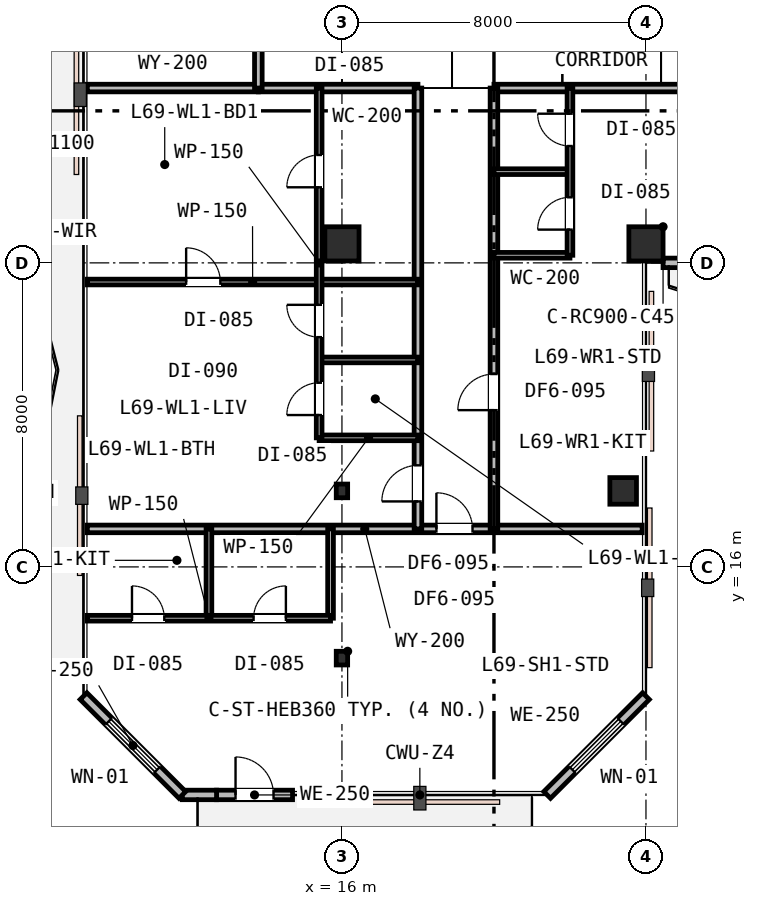
"""IFC4 building model, lengths in metres.
Left out: names, types, materials, properties, quantities, classifications, styles, units other than length and angle.
Written with IfcOpenShell. Run it as: python <this file> out.ifc"""

import sys

from ifc_helpers import new_model, si_unit, direction, frame, frame_2d, origin, origin_2d, place, context, subcontext, project, spatial, rectangle, i_section, extrude, element, fill, save


model = new_model("IFC4")
c1 = context("Model", 3, precision=1e-05, world=origin(), true_north=direction((0.0, 1.0)))
c2 = subcontext(c1, "Body", "Model", "MODEL_VIEW")
j1 = project(units=[si_unit("LENGTHUNIT", "METRE"), si_unit("PLANEANGLEUNIT", "RADIAN")], contexts=[c1])
p1 = place(None, origin())
s1 = spatial("IfcSite", under=j1, at=p1, CompositionType="ELEMENT")
p2 = place(p1, origin())
s2 = spatial("IfcBuilding", under=s1, at=p2, CompositionType="ELEMENT")
p3 = place(p2, frame((0.0, 0.0, 267.8)))
s3 = spatial("IfcBuildingStorey", under=s2, at=p3, CompositionType="ELEMENT", Elevation=267.8)
for number, where, z_axis, x_axis in (
    (1, (16.0, 24.5, 0.0), (0.0, 0.0, 1.0), (1.0, 0.0, 0.0)),
    (2, (24.0, 24.5, 0.0), (0.0, 0.0, 1.0), (1.0, 0.0, 0.0)),
):
    element("IfcColumn", number, at=place(p3, frame(where, z_axis=z_axis, x_axis=x_axis)), inside=s3, PredefinedType="COLUMN", context=c2, shape_type="SweptSolid", body=[
        extrude(rectangle(XDim=0.9, YDim=0.9, at=origin_2d()), origin(), (0.0, 0.0, 1.0), 3.8),
    ])
p4 = place(p3, frame((23.4, 18.0, 0.0), z_axis=(0.0, 0.0, 1.0), x_axis=(1.0, 0.0, 0.0)))
e3 = element("IfcColumn", 3, at=p4, inside=s3, PredefinedType="COLUMN", context=c2, shape_type="SweptSolid", body=[
    extrude(rectangle(XDim=0.7, YDim=0.7, at=origin_2d()), origin(), (0.0, 0.0, 1.0), 3.8),
])
for number, where, z_axis, x_axis in (
    (4, (16.0, 13.6, 0.0), (0.0, 0.0, 1.0), (1.0, 0.0, 0.0)),
    (5, (16.0, 18.0, 0.0), (0.0, 0.0, 1.0), (1.0, 0.0, 0.0)),
):
    element("IfcColumn", number, at=place(p3, frame(where, z_axis=z_axis, x_axis=x_axis)), inside=s3, PredefinedType="COLUMN", context=c2, shape_type="SweptSolid", body=[
        extrude(i_section(OverallWidth=0.3, OverallDepth=0.36, WebThickness=0.013, FlangeThickness=0.022, FilletRadius=0.027, at=origin_2d()), origin(), (0.0, 0.0, 1.0), 3.8),
    ])
p5 = place(p3, frame((12.7, 10.0, 0.0), z_axis=(0.0, 0.0, 1.0), x_axis=(1.0, 0.0, 0.0)))
e6 = element("IfcWall", 6, at=p5, inside=s3, PredefinedType="STANDARD", context=c2, shape_type="SweptSolid", body=[
    extrude(rectangle(XDim=2.0, YDim=0.25, at=frame_2d((1.0, 0.0))), origin(), (0.0, 0.0, 1.0), 3.53),
])
p6 = place(p5, frame((0.5, 0.0, 0.0)))
e7 = element("IfcOpeningElement", 7, at=p6, cuts=e6, PredefinedType="OPENING", context=c2, shape_type="SweptSolid", body=[
    extrude(rectangle(XDim=1.0, YDim=2.15, at=frame_2d((0.5, 1.075))), frame((0.0, 0.135, 0.0), z_axis=(0.0, -1.0, 0.0), x_axis=(1.0, 0.0, 0.0)), (0.0, 0.0, 1.0), 0.27),
])
p7 = place(p3, frame((11.8, 10.0, 0.0), z_axis=(0.0, 0.0, 1.0), x_axis=(1.0, 0.0, 0.0)))
e8 = element("IfcWall", 8, at=p7, inside=s3, PredefinedType="STANDARD", context=c2, shape_type="SweptSolid", body=[
    extrude(rectangle(XDim=0.9, YDim=0.25, at=frame_2d((0.45, 0.0))), origin(), (0.0, 0.0, 1.0), 3.53),
])
p8 = place(p3, frame((21.4, 10.0, 0.0), z_axis=(0.0, 0.0, 1.0), x_axis=(0.707106781187, 0.707106781187, 0.0)))
e9 = element("IfcWall", 9, at=p8, inside=s3, PredefinedType="STANDARD", context=c2, shape_type="SweptSolid", body=[
    extrude(rectangle(XDim=3.677, YDim=0.25, at=frame_2d((1.839, 0.0))), origin(), (0.0, 0.0, 1.0), 3.53),
])
p9 = place(p8, frame((0.939, 0.0, 0.75)))
e10 = element("IfcOpeningElement", 10, at=p9, cuts=e9, PredefinedType="OPENING", context=c2, shape_type="SweptSolid", body=[
    extrude(rectangle(XDim=1.8, YDim=1.85, at=frame_2d((0.9, 0.925))), frame((0.0, 0.135, 0.0), z_axis=(0.0, -1.0, 0.0), x_axis=(1.0, 0.0, 0.0)), (0.0, 0.0, 1.0), 0.27),
])
p10 = place(p3, frame((24.45, 24.0, 0.0), z_axis=(0.0, 0.0, 1.0), x_axis=(1.0, 0.0, 0.0)))
e11 = element("IfcWall", 11, at=p10, inside=s3, PredefinedType="STANDARD", context=c2, shape_type="SweptSolid", body=[
    extrude(rectangle(XDim=0.95, YDim=0.25, at=frame_2d((0.475, 0.0))), origin(), (0.0, 0.0, 1.0), 3.27),
])
p11 = place(p3, frame((9.2, 12.6, 0.0), z_axis=(0.0, 0.0, 1.0), x_axis=(0.707106781187, -0.707106781187, 0.0)))
e12 = element("IfcWall", 12, at=p11, inside=s3, PredefinedType="STANDARD", context=c2, shape_type="SweptSolid", body=[
    extrude(rectangle(XDim=3.677, YDim=0.25, at=frame_2d((1.839, 0.0))), origin(), (0.0, 0.0, 1.0), 3.53),
])
p12 = place(p11, frame((0.939, 0.0, 0.75)))
e13 = element("IfcOpeningElement", 13, at=p12, cuts=e12, PredefinedType="OPENING", context=c2, shape_type="SweptSolid", body=[
    extrude(rectangle(XDim=1.8, YDim=1.85, at=frame_2d((0.9, 0.925))), frame((0.0, 0.135, 0.0), z_axis=(0.0, -1.0, 0.0), x_axis=(1.0, 0.0, 0.0)), (0.0, 0.0, 1.0), 0.27),
])
p13 = place(p3, frame((9.3, 28.6, 0.0), z_axis=(0.0, 0.0, 1.0), x_axis=(1.0, 0.0, 0.0)))
e14 = element("IfcWall", 14, at=p13, inside=s3, PredefinedType="PARTITIONING", context=c2, shape_type="SweptSolid", body=[
    extrude(rectangle(XDim=4.5, YDim=0.2, at=frame_2d((2.25, 0.0))), origin(), (0.0, 0.0, 1.0), 3.53),
])
p14 = place(p3, frame((13.8, 28.6, 0.0), z_axis=(0.0, 0.0, 1.0), x_axis=(1.0, 0.0, 0.0)))
e15 = element("IfcWall", 15, at=p14, inside=s3, PredefinedType="PARTITIONING", context=c2, shape_type="SweptSolid", body=[
    extrude(rectangle(XDim=4.2, YDim=0.2, at=frame_2d((2.1, 0.0))), origin(), (0.0, 0.0, 1.0), 3.16),
])
p15 = place(p3, frame((20.0, 28.6, 0.0), z_axis=(0.0, 0.0, 1.0), x_axis=(1.0, 0.0, 0.0)))
e16 = element("IfcWall", 16, at=p15, inside=s3, PredefinedType="PARTITIONING", context=c2, shape_type="SweptSolid", body=[
    extrude(rectangle(XDim=25.9, YDim=0.2, at=frame_2d((12.95, 0.0))), origin(), (0.0, 0.0, 1.0), 3.16),
])
p16 = place(p15, frame((7.025, 0.0, 0.0)))
e17 = element("IfcOpeningElement", 17, at=p16, cuts=e16, PredefinedType="OPENING", context=c2, shape_type="SweptSolid", body=[
    extrude(rectangle(XDim=0.95, YDim=2.15, at=frame_2d((0.475, 1.075))), frame((0.0, 0.11, 0.0), z_axis=(0.0, -1.0, 0.0), x_axis=(1.0, 0.0, 0.0)), (0.0, 0.0, 1.0), 0.22),
])
p17 = place(p15, frame((13.625, 0.0, 0.0)))
e18 = element("IfcOpeningElement", 18, at=p17, cuts=e16, PredefinedType="OPENING", context=c2, shape_type="SweptSolid", body=[
    extrude(rectangle(XDim=0.95, YDim=2.15, at=frame_2d((0.475, 1.075))), frame((0.0, 0.11, 0.0), z_axis=(0.0, -1.0, 0.0), x_axis=(1.0, 0.0, 0.0)), (0.0, 0.0, 1.0), 0.22),
])
p18 = place(p15, frame((18.378, 0.0, 0.0)))
e19 = element("IfcOpeningElement", 19, at=p18, cuts=e16, PredefinedType="OPENING", context=c2, shape_type="SweptSolid", body=[
    extrude(rectangle(XDim=0.95, YDim=2.15, at=frame_2d((0.475, 1.075))), frame((0.0, 0.11, 0.0), z_axis=(0.0, -1.0, 0.0), x_axis=(1.0, 0.0, 0.0)), (0.0, 0.0, 1.0), 0.22),
])
p19 = place(p3, frame((13.8, 28.6, 0.0), z_axis=(0.0, 0.0, 1.0), x_axis=(0.0, 1.0, 0.0)))
e20 = element("IfcWall", 20, at=p19, inside=s3, PredefinedType="PARTITIONING", context=c2, shape_type="SweptSolid", body=[
    extrude(rectangle(XDim=7.4, YDim=0.2, at=frame_2d((3.7, 0.0))), origin(), (0.0, 0.0, 1.0), 3.53),
])
p20 = place(p19, frame((4.325, 0.0, 0.0)))
e21 = element("IfcOpeningElement", 21, at=p20, cuts=e20, PredefinedType="OPENING", context=c2, shape_type="SweptSolid", body=[
    extrude(rectangle(XDim=0.95, YDim=2.15, at=frame_2d((0.475, 1.075))), frame((0.0, 0.11, 0.0), z_axis=(0.0, -1.0, 0.0), x_axis=(1.0, 0.0, 0.0)), (0.0, 0.0, 1.0), 0.22),
])
p21 = place(p3, frame((9.3, 17.0, 0.0), z_axis=(0.0, 0.0, 1.0), x_axis=(1.0, 0.0, 0.0)))
e22 = element("IfcWall", 22, at=p21, inside=s3, PredefinedType="PARTITIONING", context=c2, shape_type="SweptSolid", body=[
    extrude(rectangle(XDim=14.6, YDim=0.2, at=frame_2d((7.3, 0.0))), origin(), (0.0, 0.0, 1.0), 3.16),
])
p22 = place(p21, frame((9.186, 0.0, 0.0)))
e23 = element("IfcOpeningElement", 23, at=p22, cuts=e22, PredefinedType="OPENING", context=c2, shape_type="SweptSolid", body=[
    extrude(rectangle(XDim=0.95, YDim=2.15, at=frame_2d((0.475, 1.075))), frame((0.0, 0.11, 0.0), z_axis=(0.0, -1.0, 0.0), x_axis=(1.0, 0.0, 0.0)), (0.0, 0.0, 1.0), 0.22),
])
p23 = place(p3, frame((18.0, 17.0, 0.0), z_axis=(0.0, 0.0, 1.0), x_axis=(0.0, 1.0, 0.0)))
e24 = element("IfcWall", 24, at=p23, inside=s3, PredefinedType="PARTITIONING", context=c2, shape_type="SweptSolid", body=[
    extrude(rectangle(XDim=11.6, YDim=0.2, at=frame_2d((5.8, 0.0))), origin(), (0.0, 0.0, 1.0), 3.16),
])
p24 = place(p23, frame((0.723, 0.0, 0.0)))
e25 = element("IfcOpeningElement", 25, at=p24, cuts=e24, PredefinedType="OPENING", context=c2, shape_type="SweptSolid", body=[
    extrude(rectangle(XDim=0.95, YDim=2.15, at=frame_2d((0.475, 1.075))), frame((0.0, 0.11, 0.0), z_axis=(0.0, -1.0, 0.0), x_axis=(1.0, 0.0, 0.0)), (0.0, 0.0, 1.0), 0.22),
])
for number, where, z_axis, x_axis in (
    (26, (15.4, 19.396, 0.0), (0.0, 0.0, 1.0), (1.0, 0.0, 0.0)),
    (27, (15.4, 21.446, 0.0), (0.0, 0.0, 1.0), (1.0, 0.0, 0.0)),
):
    element("IfcWall", number, at=place(p3, frame(where, z_axis=z_axis, x_axis=x_axis)), inside=s3, PredefinedType="PARTITIONING", context=c2, shape_type="SweptSolid", body=[
        extrude(rectangle(XDim=2.6, YDim=0.15, at=frame_2d((1.3, 0.0))), origin(), (0.0, 0.0, 1.0), 3.16),
    ])
p25 = place(p3, frame((9.3, 23.496, 0.0), z_axis=(0.0, 0.0, 1.0), x_axis=(1.0, 0.0, 0.0)))
e28 = element("IfcWall", 28, at=p25, inside=s3, PredefinedType="PARTITIONING", context=c2, shape_type="SweptSolid", body=[
    extrude(rectangle(XDim=8.7, YDim=0.15, at=frame_2d((4.35, 0.0))), origin(), (0.0, 0.0, 1.0), 3.16),
])
p26 = place(p25, frame((2.6, 0.0, 0.0)))
e29 = element("IfcOpeningElement", 29, at=p26, cuts=e28, PredefinedType="OPENING", context=c2, shape_type="SweptSolid", body=[
    extrude(rectangle(XDim=0.9, YDim=2.15, at=frame_2d((0.45, 1.075))), frame((0.0, 0.085, 0.0), z_axis=(0.0, -1.0, 0.0), x_axis=(1.0, 0.0, 0.0)), (0.0, 0.0, 1.0), 0.17),
])
p27 = place(p3, frame((15.4, 19.396, 0.0), z_axis=(0.0, 0.0, 1.0), x_axis=(0.0, 1.0, 0.0)))
e30 = element("IfcWall", 30, at=p27, inside=s3, PredefinedType="PARTITIONING", context=c2, shape_type="SweptSolid", body=[
    extrude(rectangle(XDim=9.204, YDim=0.15, at=frame_2d((4.602, 0.0))), origin(), (0.0, 0.0, 1.0), 3.53),
])
p28 = place(p27, frame((0.6, 0.0, 0.0)))
e31 = element("IfcOpeningElement", 31, at=p28, cuts=e30, PredefinedType="OPENING", context=c2, shape_type="SweptSolid", body=[
    extrude(rectangle(XDim=0.85, YDim=2.15, at=frame_2d((0.425, 1.075))), frame((0.0, 0.085, 0.0), z_axis=(0.0, -1.0, 0.0), x_axis=(1.0, 0.0, 0.0)), (0.0, 0.0, 1.0), 0.17),
])
p29 = place(p27, frame((2.65, 0.0, 0.0)))
e32 = element("IfcOpeningElement", 32, at=p29, cuts=e30, PredefinedType="OPENING", context=c2, shape_type="SweptSolid", body=[
    extrude(rectangle(XDim=0.85, YDim=2.15, at=frame_2d((0.425, 1.075))), frame((0.0, 0.085, 0.0), z_axis=(0.0, -1.0, 0.0), x_axis=(1.0, 0.0, 0.0)), (0.0, 0.0, 1.0), 0.17),
])
p30 = place(p27, frame((6.593, 0.0, 0.0)))
e33 = element("IfcOpeningElement", 33, at=p30, cuts=e30, PredefinedType="OPENING", context=c2, shape_type="SweptSolid", body=[
    extrude(rectangle(XDim=0.85, YDim=2.15, at=frame_2d((0.425, 1.075))), frame((0.0, 0.085, 0.0), z_axis=(0.0, -1.0, 0.0), x_axis=(1.0, 0.0, 0.0)), (0.0, 0.0, 1.0), 0.17),
])
p31 = place(p3, frame((20.0, 17.0, 0.0), z_axis=(0.0, 0.0, 1.0), x_axis=(0.0, 1.0, 0.0)))
e34 = element("IfcWall", 34, at=p31, inside=s3, PredefinedType="PARTITIONING", context=c2, shape_type="SweptSolid", body=[
    extrude(rectangle(XDim=11.6, YDim=0.2, at=frame_2d((5.8, 0.0))), origin(), (0.0, 0.0, 1.0), 3.16),
])
p32 = place(p31, frame((3.125, 0.0, 0.0)))
e35 = element("IfcOpeningElement", 35, at=p32, cuts=e34, PredefinedType="OPENING", context=c2, shape_type="SweptSolid", body=[
    extrude(rectangle(XDim=0.95, YDim=2.15, at=frame_2d((0.475, 1.075))), frame((0.0, 0.11, 0.0), z_axis=(0.0, -1.0, 0.0), x_axis=(1.0, 0.0, 0.0)), (0.0, 0.0, 1.0), 0.22),
])
p33 = place(p3, frame((20.0, 24.2, 0.0), z_axis=(0.0, 0.0, 1.0), x_axis=(1.0, 0.0, 0.0)))
e36 = element("IfcWall", 36, at=p33, inside=s3, PredefinedType="PARTITIONING", context=c2, shape_type="SweptSolid", body=[
    extrude(rectangle(XDim=2.0, YDim=0.15, at=frame_2d((1.0, 0.0))), origin(), (0.0, 0.0, 1.0), 3.16),
])
p34 = place(p3, frame((20.0, 26.4, 0.0), z_axis=(0.0, 0.0, 1.0), x_axis=(1.0, 0.0, 0.0)))
e37 = element("IfcWall", 37, at=p34, inside=s3, PredefinedType="PARTITIONING", context=c2, shape_type="SweptSolid", body=[
    extrude(rectangle(XDim=2.0, YDim=0.15, at=frame_2d((1.0, 0.0))), origin(), (0.0, 0.0, 1.0), 3.28),
])
p35 = place(p3, frame((22.0, 24.2, 0.0), z_axis=(0.0, 0.0, 1.0), x_axis=(0.0, 1.0, 0.0)))
e38 = element("IfcWall", 38, at=p35, inside=s3, PredefinedType="PARTITIONING", context=c2, shape_type="SweptSolid", body=[
    extrude(rectangle(XDim=4.4, YDim=0.15, at=frame_2d((2.2, 0.0))), origin(), (0.0, 0.0, 1.0), 3.16),
])
p36 = place(p35, frame((0.675, 0.0, 0.0)))
e39 = element("IfcOpeningElement", 39, at=p36, cuts=e38, PredefinedType="OPENING", context=c2, shape_type="SweptSolid", body=[
    extrude(rectangle(XDim=0.85, YDim=2.15, at=frame_2d((0.425, 1.075))), frame((0.0, 0.085, 0.0), z_axis=(0.0, -1.0, 0.0), x_axis=(1.0, 0.0, 0.0)), (0.0, 0.0, 1.0), 0.17),
])
p37 = place(p35, frame((2.875, 0.0, 0.0)))
e40 = element("IfcOpeningElement", 40, at=p37, cuts=e38, PredefinedType="OPENING", context=c2, shape_type="SweptSolid", body=[
    extrude(rectangle(XDim=0.85, YDim=2.15, at=frame_2d((0.425, 1.075))), frame((0.0, 0.085, 0.0), z_axis=(0.0, -1.0, 0.0), x_axis=(1.0, 0.0, 0.0)), (0.0, 0.0, 1.0), 0.17),
])
p38 = place(p3, frame((15.7, 14.65, 0.0), z_axis=(0.0, 0.0, 1.0), x_axis=(0.0, 1.0, 0.0)))
e41 = element("IfcWall", 41, at=p38, inside=s3, PredefinedType="PARTITIONING", context=c2, shape_type="SweptSolid", body=[
    extrude(rectangle(XDim=2.35, YDim=0.15, at=frame_2d((1.175, 0.0))), origin(), (0.0, 0.0, 1.0), 3.16),
])
p39 = place(p3, frame((12.5, 14.65, 0.0), z_axis=(0.0, 0.0, 1.0), x_axis=(0.0, 1.0, 0.0)))
e42 = element("IfcWall", 42, at=p39, inside=s3, PredefinedType="PARTITIONING", context=c2, shape_type="SweptSolid", body=[
    extrude(rectangle(XDim=2.35, YDim=0.15, at=frame_2d((1.175, 0.0))), origin(), (0.0, 0.0, 1.0), 3.53),
])
p40 = place(p3, frame((9.3, 14.65, 0.0), z_axis=(0.0, 0.0, 1.0), x_axis=(1.0, 0.0, 0.0)))
e43 = element("IfcWall", 43, at=p40, inside=s3, PredefinedType="PARTITIONING", context=c2, shape_type="SweptSolid", body=[
    extrude(rectangle(XDim=6.4, YDim=0.15, at=frame_2d((3.2, 0.0))), origin(), (0.0, 0.0, 1.0), 3.16),
])
p41 = place(p40, frame((1.175, 0.0, 0.0)))
e44 = element("IfcOpeningElement", 44, at=p41, cuts=e43, PredefinedType="OPENING", context=c2, shape_type="SweptSolid", body=[
    extrude(rectangle(XDim=0.85, YDim=2.15, at=frame_2d((0.425, 1.075))), frame((0.0, 0.085, 0.0), z_axis=(0.0, -1.0, 0.0), x_axis=(1.0, 0.0, 0.0)), (0.0, 0.0, 1.0), 0.17),
])
p42 = place(p40, frame((4.375, 0.0, 0.0)))
e45 = element("IfcOpeningElement", 45, at=p42, cuts=e43, PredefinedType="OPENING", context=c2, shape_type="SweptSolid", body=[
    extrude(rectangle(XDim=0.85, YDim=2.15, at=frame_2d((0.425, 1.075))), frame((0.0, 0.085, 0.0), z_axis=(0.0, -1.0, 0.0), x_axis=(1.0, 0.0, 0.0)), (0.0, 0.0, 1.0), 0.17),
])
p43 = place(p6, origin())
e46 = element("IfcDoor", 46, at=p43, inside=s3, OperationType="SINGLE_SWING_LEFT", PredefinedType="DOOR", context=c2, shape_type="SweptSolid", body=[
    extrude(rectangle(XDim=1.0, YDim=2.15, at=frame_2d((0.5, 1.075))), frame((0.0, 0.025, 0.0), z_axis=(0.0, -1.0, 0.0), x_axis=(1.0, 0.0, 0.0)), (0.0, 0.0, 1.0), 0.05),
])
fill(e7, e46)
p44 = place(p9, origin())
e47 = element("IfcWindow", 47, at=p44, inside=s3, PartitioningType="SINGLE_PANEL", PredefinedType="WINDOW", context=c2, shape_type="SweptSolid", body=[
    extrude(rectangle(XDim=1.8, YDim=1.85, at=frame_2d((0.9, 0.925))), frame((0.0, 0.03, 0.0), z_axis=(0.0, -1.0, 0.0), x_axis=(1.0, 0.0, 0.0)), (0.0, 0.0, 1.0), 0.06),
])
fill(e10, e47)
p45 = place(p12, origin())
e48 = element("IfcWindow", 48, at=p45, inside=s3, PartitioningType="SINGLE_PANEL", PredefinedType="WINDOW", context=c2, shape_type="SweptSolid", body=[
    extrude(rectangle(XDim=1.8, YDim=1.85, at=frame_2d((0.9, 0.925))), frame((0.0, 0.03, 0.0), z_axis=(0.0, -1.0, 0.0), x_axis=(1.0, 0.0, 0.0)), (0.0, 0.0, 1.0), 0.06),
])
fill(e13, e48)
p46 = place(p24, origin())
e49 = element("IfcDoor", 49, at=p46, inside=s3, OperationType="SINGLE_SWING_LEFT", PredefinedType="DOOR", context=c2, shape_type="SweptSolid", body=[
    extrude(rectangle(XDim=0.95, YDim=2.15, at=frame_2d((0.475, 1.075))), frame((0.0, 0.025, 0.0), z_axis=(0.0, -1.0, 0.0), x_axis=(1.0, 0.0, 0.0)), (0.0, 0.0, 1.0), 0.05),
])
fill(e25, e49)
p47 = place(p28, origin())
e50 = element("IfcDoor", 50, at=p47, inside=s3, OperationType="SINGLE_SWING_LEFT", PredefinedType="DOOR", context=c2, shape_type="SweptSolid", body=[
    extrude(rectangle(XDim=0.85, YDim=2.15, at=frame_2d((0.425, 1.075))), frame((0.0, 0.025, 0.0), z_axis=(0.0, -1.0, 0.0), x_axis=(1.0, 0.0, 0.0)), (0.0, 0.0, 1.0), 0.05),
])
fill(e31, e50)
p48 = place(p29, origin())
e51 = element("IfcDoor", 51, at=p48, inside=s3, OperationType="SINGLE_SWING_RIGHT", PredefinedType="DOOR", context=c2, shape_type="SweptSolid", body=[
    extrude(rectangle(XDim=0.85, YDim=2.15, at=frame_2d((0.425, 1.075))), frame((0.0, 0.025, 0.0), z_axis=(0.0, -1.0, 0.0), x_axis=(1.0, 0.0, 0.0)), (0.0, 0.0, 1.0), 0.05),
])
fill(e32, e51)
p49 = place(p30, origin())
e52 = element("IfcDoor", 52, at=p49, inside=s3, OperationType="SINGLE_SWING_LEFT", PredefinedType="DOOR", context=c2, shape_type="SweptSolid", body=[
    extrude(rectangle(XDim=0.85, YDim=2.15, at=frame_2d((0.425, 1.075))), frame((0.0, 0.025, 0.0), z_axis=(0.0, -1.0, 0.0), x_axis=(1.0, 0.0, 0.0)), (0.0, 0.0, 1.0), 0.05),
])
fill(e33, e52)
p50 = place(p26, origin())
e53 = element("IfcDoor", 53, at=p50, inside=s3, OperationType="SINGLE_SWING_LEFT", PredefinedType="DOOR", context=c2, shape_type="SweptSolid", body=[
    extrude(rectangle(XDim=0.9, YDim=2.15, at=frame_2d((0.45, 1.075))), frame((0.0, 0.025, 0.0), z_axis=(0.0, -1.0, 0.0), x_axis=(1.0, 0.0, 0.0)), (0.0, 0.0, 1.0), 0.05),
])
fill(e29, e53)
p51 = place(p32, origin())
e54 = element("IfcDoor", 54, at=p51, inside=s3, OperationType="SINGLE_SWING_LEFT", PredefinedType="DOOR", context=c2, shape_type="SweptSolid", body=[
    extrude(rectangle(XDim=0.95, YDim=2.15, at=frame_2d((0.475, 1.075))), frame((0.0, 0.025, 0.0), z_axis=(0.0, -1.0, 0.0), x_axis=(1.0, 0.0, 0.0)), (0.0, 0.0, 1.0), 0.05),
])
fill(e35, e54)
p52 = place(p36, origin())
e55 = element("IfcDoor", 55, at=p52, inside=s3, OperationType="SINGLE_SWING_LEFT", PredefinedType="DOOR", context=c2, shape_type="SweptSolid", body=[
    extrude(rectangle(XDim=0.85, YDim=2.15, at=frame_2d((0.425, 1.075))), frame((0.0, 0.025, 0.0), z_axis=(0.0, -1.0, 0.0), x_axis=(1.0, 0.0, 0.0)), (0.0, 0.0, 1.0), 0.05),
])
fill(e39, e55)
p53 = place(p37, origin())
e56 = element("IfcDoor", 56, at=p53, inside=s3, OperationType="SINGLE_SWING_RIGHT", PredefinedType="DOOR", context=c2, shape_type="SweptSolid", body=[
    extrude(rectangle(XDim=0.85, YDim=2.15, at=frame_2d((0.425, 1.075))), frame((0.0, 0.025, 0.0), z_axis=(0.0, -1.0, 0.0), x_axis=(1.0, 0.0, 0.0)), (0.0, 0.0, 1.0), 0.05),
])
fill(e40, e56)
p54 = place(p22, origin())
e57 = element("IfcDoor", 57, at=p54, inside=s3, OperationType="SINGLE_SWING_LEFT", PredefinedType="DOOR", context=c2, shape_type="SweptSolid", body=[
    extrude(rectangle(XDim=0.95, YDim=2.15, at=frame_2d((0.475, 1.075))), frame((0.0, 0.025, 0.0), z_axis=(0.0, -1.0, 0.0), x_axis=(1.0, 0.0, 0.0)), (0.0, 0.0, 1.0), 0.05),
])
fill(e23, e57)
p55 = place(p41, origin())
e58 = element("IfcDoor", 58, at=p55, inside=s3, OperationType="SINGLE_SWING_LEFT", PredefinedType="DOOR", context=c2, shape_type="SweptSolid", body=[
    extrude(rectangle(XDim=0.85, YDim=2.15, at=frame_2d((0.425, 1.075))), frame((0.0, 0.025, 0.0), z_axis=(0.0, -1.0, 0.0), x_axis=(1.0, 0.0, 0.0)), (0.0, 0.0, 1.0), 0.05),
])
fill(e44, e58)
p56 = place(p42, origin())
e59 = element("IfcDoor", 59, at=p56, inside=s3, OperationType="SINGLE_SWING_RIGHT", PredefinedType="DOOR", context=c2, shape_type="SweptSolid", body=[
    extrude(rectangle(XDim=0.85, YDim=2.15, at=frame_2d((0.425, 1.075))), frame((0.0, 0.025, 0.0), z_axis=(0.0, -1.0, 0.0), x_axis=(1.0, 0.0, 0.0)), (0.0, 0.0, 1.0), 0.05),
])
fill(e45, e59)
save(model, sys.argv[1])
